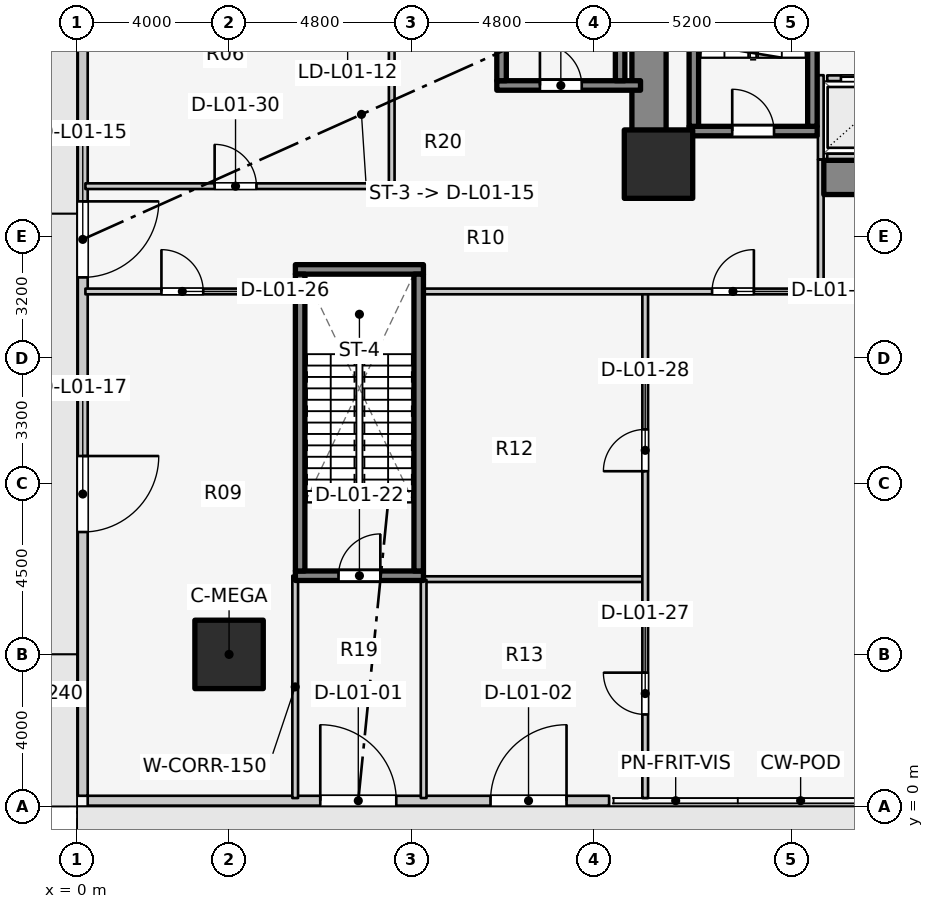
"""IFC4 building model, lengths in metres.
Left out: names, types, materials, properties, quantities, classifications, styles, units other than length and angle.
Written with IfcOpenShell. Run it as: python <this file> out.ifc"""

import sys

from ifc_helpers import new_model, si_unit, direction, frame, frame_2d, origin, origin_2d, place, context, subcontext, project, spatial, rectangle, extrude, element, fill, save


model = new_model("IFC4")
c1 = context("Model", 3, precision=1e-05, world=origin(), true_north=direction((0.0, 1.0)))
c2 = subcontext(c1, "Body", "Model", "MODEL_VIEW")
j1 = project(units=[si_unit("LENGTHUNIT", "METRE"), si_unit("PLANEANGLEUNIT", "RADIAN")], contexts=[c1])
p1 = place(None, origin())
s1 = spatial("IfcSite", under=j1, at=p1, CompositionType="ELEMENT")
p2 = place(p1, origin())
s2 = spatial("IfcBuilding", under=s1, at=p2, CompositionType="ELEMENT")
p3 = place(p2, origin())
s3 = spatial("IfcBuildingStorey", under=s2, at=p3, CompositionType="ELEMENT", Elevation=0.0)
p4 = place(p3, frame((15.05, 17.05, 0.0), z_axis=(0.0, 0.0, 1.0), x_axis=(0.0, 1.0, 0.0)))
e1 = element("IfcWall", 1, at=p4, inside=s3, PredefinedType="SHEAR", context=c2, shape_type="SweptSolid", body=[
    extrude(rectangle(XDim=12.8, YDim=0.9, at=frame_2d((6.4, 0.0))), origin(), (0.0, 0.0, 1.0), 4.6),
])
p5 = place(p3, frame((19.65, 16.55, 0.0), z_axis=(0.0, 0.0, 1.0), x_axis=(1.0, 0.0, 0.0)))
e2 = element("IfcWall", 2, at=p5, inside=s3, PredefinedType="SHEAR", context=c2, shape_type="SweptSolid", body=[
    extrude(rectangle(XDim=4.5, YDim=0.9, at=frame_2d((2.25, 0.0))), origin(), (0.0, 0.0, 1.0), 4.6),
])
p6 = place(p3, frame((16.105, 17.77, 0.0), z_axis=(0.0, 0.0, 1.0), x_axis=(1.0, 0.0, 0.0)))
e3 = element("IfcWall", 3, at=p6, inside=s3, PredefinedType="SOLIDWALL", context=c2, shape_type="SweptSolid", body=[
    extrude(rectangle(XDim=3.37, YDim=0.25, at=frame_2d((1.685, 0.0))), origin(), (0.0, 0.0, 1.0), 4.6),
])
p7 = place(p6, frame((1.135, 0.0, 0.0)))
e4 = element("IfcOpeningElement", 4, at=p7, cuts=e3, PredefinedType="OPENING", context=c2, shape_type="SweptSolid", body=[
    extrude(rectangle(XDim=1.1, YDim=2.1, at=frame_2d((0.55, 1.05))), frame((0.0, 0.135, 0.0), z_axis=(0.0, -1.0, 0.0), x_axis=(1.0, 0.0, 0.0)), (0.0, 0.0, 1.0), 0.27),
])
for number, where, z_axis, x_axis in (
    (5, (16.23, 17.895, 0.0), (0.0, 0.0, 1.0), (0.0, 1.0, 0.0)),
    (6, (19.35, 17.895, 0.0), (0.0, 0.0, 1.0), (0.0, 1.0, 0.0)),
):
    element("IfcWall", number, at=place(p3, frame(where, z_axis=z_axis, x_axis=x_axis)), inside=s3, PredefinedType="SOLIDWALL", context=c2, shape_type="SweptSolid", body=[
        extrude(rectangle(XDim=7.81, YDim=0.25, at=frame_2d((3.905, 0.0))), origin(), (0.0, 0.0, 1.0), 4.6),
    ])
p8 = place(p3, frame((11.045, 18.97, 0.0), z_axis=(0.0, 0.0, 1.0), x_axis=(1.0, 0.0, 0.0)))
e7 = element("IfcWall", 7, at=p8, inside=s3, PredefinedType="SOLIDWALL", context=c2, shape_type="SweptSolid", body=[
    extrude(rectangle(XDim=3.782, YDim=0.25, at=frame_2d((1.891, 0.0))), origin(), (0.0, 0.0, 1.0), 4.6),
])
p9 = place(p8, frame((1.135, 0.0, 0.0)))
e8 = element("IfcOpeningElement", 8, at=p9, cuts=e7, PredefinedType="OPENING", context=c2, shape_type="SweptSolid", body=[
    extrude(rectangle(XDim=1.1, YDim=2.1, at=frame_2d((0.55, 1.05))), frame((0.0, 0.135, 0.0), z_axis=(0.0, -1.0, 0.0), x_axis=(1.0, 0.0, 0.0)), (0.0, 0.0, 1.0), 0.27),
])
for number, where, z_axis, x_axis in (
    (9, (11.17, 19.095, 0.0), (0.0, 0.0, 1.0), (0.0, 1.0, 0.0)),
    (10, (14.29, 19.095, 0.0), (0.0, 0.0, 1.0), (0.0, 1.0, 0.0)),
):
    element("IfcWall", number, at=place(p3, frame(where, z_axis=z_axis, x_axis=x_axis)), inside=s3, PredefinedType="SOLIDWALL", context=c2, shape_type="SweptSolid", body=[
        extrude(rectangle(XDim=7.81, YDim=0.25, at=frame_2d((3.905, 0.0))), origin(), (0.0, 0.0, 1.0), 4.6),
    ])
p10 = place(p3, frame((5.745, 6.07, 0.0), z_axis=(0.0, 0.0, 1.0), x_axis=(1.0, 0.0, 0.0)))
e11 = element("IfcWall", 11, at=p10, inside=s3, PredefinedType="SOLIDWALL", context=c2, shape_type="SweptSolid", body=[
    extrude(rectangle(XDim=3.37, YDim=0.25, at=frame_2d((1.685, 0.0))), origin(), (0.0, 0.0, 1.0), 4.6),
])
p11 = place(p10, frame((1.135, 0.0, 0.0)))
e12 = element("IfcOpeningElement", 12, at=p11, cuts=e11, PredefinedType="OPENING", context=c2, shape_type="SweptSolid", body=[
    extrude(rectangle(XDim=1.1, YDim=2.1, at=frame_2d((0.55, 1.05))), frame((0.0, 0.135, 0.0), z_axis=(0.0, -1.0, 0.0), x_axis=(1.0, 0.0, 0.0)), (0.0, 0.0, 1.0), 0.27),
])
p12 = place(p3, frame((5.745, 14.13, 0.0), z_axis=(0.0, 0.0, 1.0), x_axis=(1.0, 0.0, 0.0)))
e13 = element("IfcWall", 13, at=p12, inside=s3, PredefinedType="SOLIDWALL", context=c2, shape_type="SweptSolid", body=[
    extrude(rectangle(XDim=3.37, YDim=0.25, at=frame_2d((1.685, 0.0))), origin(), (0.0, 0.0, 1.0), 4.6),
])
for number, where, z_axis, x_axis in (
    (14, (5.87, 6.195, 0.0), (0.0, 0.0, 1.0), (0.0, 1.0, 0.0)),
    (15, (8.99, 6.195, 0.0), (0.0, 0.0, 1.0), (0.0, 1.0, 0.0)),
):
    element("IfcWall", number, at=place(p3, frame(where, z_axis=z_axis, x_axis=x_axis)), inside=s3, PredefinedType="SOLIDWALL", context=c2, shape_type="SweptSolid", body=[
        extrude(rectangle(XDim=7.81, YDim=0.25, at=frame_2d((3.905, 0.0))), origin(), (0.0, 0.0, 1.0), 4.6),
    ])
for number, where, z_axis, x_axis in (
    (16, (15.3, 16.9, 0.0), (0.0, 0.0, 1.0), (1.0, 0.0, 0.0)),
    (17, (4.0, 4.0, 0.0), (0.0, 0.0, 1.0), (1.0, 0.0, 0.0)),
):
    element("IfcColumn", number, at=place(p3, frame(where, z_axis=z_axis, x_axis=x_axis)), inside=s3, PredefinedType="COLUMN", context=c2, shape_type="SweptSolid", body=[
        extrude(rectangle(XDim=1.8, YDim=1.8, at=origin_2d()), origin(), (0.0, 0.0, 1.0), 4.6),
    ])
p13 = place(p3, frame((0.28, 0.15, 0.0), z_axis=(0.0, 0.0, 1.0), x_axis=(1.0, 0.0, 0.0)))
e18 = element("IfcWall", 18, at=p13, inside=s3, PredefinedType="STANDARD", context=c2, shape_type="SweptSolid", body=[
    extrude(rectangle(XDim=13.72, YDim=0.26, at=frame_2d((6.86, 0.0))), origin(), (0.0, 0.0, 1.0), 4.28),
])
p14 = place(p13, frame((6.12, 0.0, 0.0)))
e19 = element("IfcOpeningElement", 19, at=p14, cuts=e18, PredefinedType="OPENING", context=c2, shape_type="SweptSolid", body=[
    extrude(rectangle(XDim=2.0, YDim=2.4, at=frame_2d((1.0, 1.2))), frame((0.0, 0.14, 0.0), z_axis=(0.0, -1.0, 0.0), x_axis=(1.0, 0.0, 0.0)), (0.0, 0.0, 1.0), 0.28),
])
p15 = place(p13, frame((10.6, 0.0, 0.0)))
e20 = element("IfcOpeningElement", 20, at=p15, cuts=e18, PredefinedType="OPENING", context=c2, shape_type="SweptSolid", body=[
    extrude(rectangle(XDim=2.0, YDim=2.4, at=frame_2d((1.0, 1.2))), frame((0.0, 0.14, 0.0), z_axis=(0.0, -1.0, 0.0), x_axis=(1.0, 0.0, 0.0)), (0.0, 0.0, 1.0), 0.28),
])
p16 = place(p3, frame((0.15, 45.72, 0.0), z_axis=(0.0, 0.0, 1.0), x_axis=(0.0, -1.0, 0.0)))
e21 = element("IfcWall", 21, at=p16, inside=s3, PredefinedType="STANDARD", context=c2, shape_type="SweptSolid", body=[
    extrude(rectangle(XDim=45.44, YDim=0.26, at=frame_2d((22.72, 0.0))), origin(), (0.0, 0.0, 1.0), 4.28),
])
p17 = place(p16, frame((29.8, 0.0, 0.0)))
e22 = element("IfcOpeningElement", 22, at=p17, cuts=e21, PredefinedType="OPENING", context=c2, shape_type="SweptSolid", body=[
    extrude(rectangle(XDim=2.0, YDim=2.4, at=frame_2d((1.0, 1.2))), frame((0.0, 0.14, 0.0), z_axis=(0.0, -1.0, 0.0), x_axis=(1.0, 0.0, 0.0)), (0.0, 0.0, 1.0), 0.28),
])
p18 = place(p16, frame((22.0, 0.0, 0.0)))
e23 = element("IfcOpeningElement", 23, at=p18, cuts=e21, PredefinedType="OPENING", context=c2, shape_type="SweptSolid", body=[
    extrude(rectangle(XDim=2.0, YDim=2.4, at=frame_2d((1.0, 1.2))), frame((0.0, 0.14, 0.0), z_axis=(0.0, -1.0, 0.0), x_axis=(1.0, 0.0, 0.0)), (0.0, 0.0, 1.0), 0.28),
])
p19 = place(p16, frame((36.5, 0.0, 0.0)))
e24 = element("IfcOpeningElement", 24, at=p19, cuts=e21, PredefinedType="OPENING", context=c2, shape_type="SweptSolid", body=[
    extrude(rectangle(XDim=2.0, YDim=2.4, at=frame_2d((1.0, 1.2))), frame((0.0, 0.14, 0.0), z_axis=(0.0, -1.0, 0.0), x_axis=(1.0, 0.0, 0.0)), (0.0, 0.0, 1.0), 0.28),
])
p20 = place(p16, frame((12.1, 0.0, 0.0)))
e25 = element("IfcOpeningElement", 25, at=p20, cuts=e21, PredefinedType="OPENING", context=c2, shape_type="SweptSolid", body=[
    extrude(rectangle(XDim=4.2, YDim=3.0, at=frame_2d((2.1, 1.5))), frame((0.0, 0.14, 0.0), z_axis=(0.0, -1.0, 0.0), x_axis=(1.0, 0.0, 0.0)), (0.0, 0.0, 1.0), 0.28),
])
p21 = place(p3, frame((19.74, 19.16, 0.0), z_axis=(0.0, 0.0, 1.0), x_axis=(1.0, 0.0, 0.0)))
e26 = element("IfcWall", 26, at=p21, inside=s3, PredefinedType="SOLIDWALL", context=c2, shape_type="SweptSolid", body=[
    extrude(rectangle(XDim=1.82, YDim=0.15, at=frame_2d((0.91, 0.0))), origin(), (0.0, 0.0, 1.0), 4.255),
])
p22 = place(p21, frame((0.36, 0.0, 0.0)))
e27 = element("IfcOpeningElement", 27, at=p22, cuts=e26, PredefinedType="OPENING", context=c2, shape_type="SweptSolid", body=[
    extrude(rectangle(XDim=1.1, YDim=2.1, at=frame_2d((0.55, 1.05))), frame((0.0, 0.085, 0.0), z_axis=(0.0, -1.0, 0.0), x_axis=(1.0, 0.0, 0.0)), (0.0, 0.0, 1.0), 0.17),
])
p23 = place(p3, frame((19.74, 17.1, 0.0), z_axis=(0.0, 0.0, 1.0), x_axis=(1.0, 0.0, 0.0)))
e28 = element("IfcWall", 28, at=p23, inside=s3, PredefinedType="SOLIDWALL", context=c2, shape_type="SweptSolid", body=[
    extrude(rectangle(XDim=1.82, YDim=0.15, at=frame_2d((0.91, 0.0))), origin(), (0.0, 0.0, 1.0), 4.255),
])
p24 = place(p3, frame((19.57, 17.02, 0.0), z_axis=(0.0, 0.0, 1.0), x_axis=(0.0, 1.0, 0.0)))
e29 = element("IfcWall", 29, at=p24, inside=s3, PredefinedType="SOLIDWALL", context=c2, shape_type="SweptSolid", body=[
    extrude(rectangle(XDim=2.22, YDim=0.15, at=frame_2d((1.11, 0.0))), origin(), (0.0, 0.0, 1.0), 3.62),
])
p25 = place(p3, frame((5.74, 0.22, 0.0), z_axis=(0.0, 0.0, 1.0), x_axis=(0.0, 1.0, 0.0)))
e30 = element("IfcWall", 30, at=p25, inside=s3, PredefinedType="PARTITIONING", context=c2, shape_type="SweptSolid", body=[
    extrude(rectangle(XDim=5.85, YDim=0.15, at=frame_2d((2.925, 0.0))), origin(), (0.0, 0.0, 1.0), 3.3),
])
p26 = place(p3, frame((0.22, 13.55, 0.0), z_axis=(0.0, 0.0, 1.0), x_axis=(1.0, 0.0, 0.0)))
e31 = element("IfcWall", 31, at=p26, inside=s3, PredefinedType="PARTITIONING", context=c2, shape_type="SweptSolid", body=[
    extrude(rectangle(XDim=5.58, YDim=0.15, at=frame_2d((2.79, 0.0))), origin(), (0.0, 0.0, 1.0), 3.3),
])
p27 = place(p26, frame((2.0, 0.0, 0.0)))
e32 = element("IfcOpeningElement", 32, at=p27, cuts=e31, PredefinedType="OPENING", context=c2, shape_type="SweptSolid", body=[
    extrude(rectangle(XDim=1.1, YDim=2.1, at=frame_2d((0.55, 1.05))), frame((0.0, 0.085, 0.0), z_axis=(0.0, -1.0, 0.0), x_axis=(1.0, 0.0, 0.0)), (0.0, 0.0, 1.0), 0.17),
])
p28 = place(p3, frame((9.12, 5.98, 0.0), z_axis=(0.0, 0.0, 1.0), x_axis=(1.0, 0.0, 0.0)))
e33 = element("IfcWall", 33, at=p28, inside=s3, PredefinedType="PARTITIONING", context=c2, shape_type="SweptSolid", body=[
    extrude(rectangle(XDim=5.86, YDim=0.15, at=frame_2d((2.93, 0.0))), origin(), (0.0, 0.0, 1.0), 4.255),
])
p29 = place(p3, frame((9.12, 0.22, 0.0), z_axis=(0.0, 0.0, 1.0), x_axis=(0.0, 1.0, 0.0)))
e34 = element("IfcWall", 34, at=p29, inside=s3, PredefinedType="PARTITIONING", context=c2, shape_type="SweptSolid", body=[
    extrude(rectangle(XDim=5.74, YDim=0.15, at=frame_2d((2.87, 0.0))), origin(), (0.0, 0.0, 1.0), 3.3),
])
p30 = place(p3, frame((14.95, 0.22, 0.0), z_axis=(0.0, 0.0, 1.0), x_axis=(0.0, 1.0, 0.0)))
e35 = element("IfcWall", 35, at=p30, inside=s3, PredefinedType="PARTITIONING", context=c2, shape_type="SweptSolid", body=[
    extrude(rectangle(XDim=13.36, YDim=0.15, at=frame_2d((6.68, 0.0))), origin(), (0.0, 0.0, 1.0), 3.3),
])
p31 = place(p30, frame((2.2, 0.0, 0.0)))
e36 = element("IfcOpeningElement", 36, at=p31, cuts=e35, PredefinedType="OPENING", context=c2, shape_type="SweptSolid", body=[
    extrude(rectangle(XDim=1.1, YDim=2.1, at=frame_2d((0.55, 1.05))), frame((0.0, 0.085, 0.0), z_axis=(0.0, -1.0, 0.0), x_axis=(1.0, 0.0, 0.0)), (0.0, 0.0, 1.0), 0.17),
])
p32 = place(p30, frame((8.6, 0.0, 0.0)))
e37 = element("IfcOpeningElement", 37, at=p32, cuts=e35, PredefinedType="OPENING", context=c2, shape_type="SweptSolid", body=[
    extrude(rectangle(XDim=1.1, YDim=2.1, at=frame_2d((0.55, 1.05))), frame((0.0, 0.085, 0.0), z_axis=(0.0, -1.0, 0.0), x_axis=(1.0, 0.0, 0.0)), (0.0, 0.0, 1.0), 0.17),
])
p33 = place(p3, frame((9.11, 13.55, 0.0), z_axis=(0.0, 0.0, 1.0), x_axis=(1.0, 0.0, 0.0)))
e38 = element("IfcWall", 38, at=p33, inside=s3, PredefinedType="PARTITIONING", context=c2, shape_type="SweptSolid", body=[
    extrude(rectangle(XDim=10.46, YDim=0.15, at=frame_2d((5.23, 0.0))), origin(), (0.0, 0.0, 1.0), 4.255),
])
p34 = place(p33, frame((7.6, 0.0, 0.0)))
e39 = element("IfcOpeningElement", 39, at=p34, cuts=e38, PredefinedType="OPENING", context=c2, shape_type="SweptSolid", body=[
    extrude(rectangle(XDim=1.1, YDim=2.1, at=frame_2d((0.55, 1.05))), frame((0.0, 0.085, 0.0), z_axis=(0.0, -1.0, 0.0), x_axis=(1.0, 0.0, 0.0)), (0.0, 0.0, 1.0), 0.17),
])
p35 = place(p3, frame((19.57, 13.55, 0.0), z_axis=(0.0, 0.0, 1.0), x_axis=(0.0, 1.0, 0.0)))
e40 = element("IfcWall", 40, at=p35, inside=s3, PredefinedType="PARTITIONING", context=c2, shape_type="SweptSolid", body=[
    extrude(rectangle(XDim=3.47, YDim=0.15, at=frame_2d((1.735, 0.0))), origin(), (0.0, 0.0, 1.0), 4.255),
])
p36 = place(p3, frame((0.22, 16.32, 0.0), z_axis=(0.0, 0.0, 1.0), x_axis=(1.0, 0.0, 0.0)))
e41 = element("IfcWall", 41, at=p36, inside=s3, PredefinedType="PARTITIONING", context=c2, shape_type="SweptSolid", body=[
    extrude(rectangle(XDim=8.1, YDim=0.15, at=frame_2d((4.05, 0.0))), origin(), (0.0, 0.0, 1.0), 3.3),
])
p37 = place(p36, frame((3.4, 0.0, 0.0)))
e42 = element("IfcOpeningElement", 42, at=p37, cuts=e41, PredefinedType="OPENING", context=c2, shape_type="SweptSolid", body=[
    extrude(rectangle(XDim=1.1, YDim=2.1, at=frame_2d((0.55, 1.05))), frame((0.0, 0.085, 0.0), z_axis=(0.0, -1.0, 0.0), x_axis=(1.0, 0.0, 0.0)), (0.0, 0.0, 1.0), 0.17),
])
p38 = place(p3, frame((8.28, 16.3, 0.0), z_axis=(0.0, 0.0, 1.0), x_axis=(0.0, 1.0, 0.0)))
e43 = element("IfcWall", 43, at=p38, inside=s3, PredefinedType="PARTITIONING", context=c2, shape_type="SweptSolid", body=[
    extrude(rectangle(XDim=12.2, YDim=0.15, at=frame_2d((6.1, 0.0))), origin(), (0.0, 0.0, 1.0), 4.255),
])
p39 = place(p14, frame((2.0, 0.0, 0.0), z_axis=(0.0, 0.0, 1.0), x_axis=(-1.0, 0.0, 0.0)))
e44 = element("IfcDoor", 44, at=p39, inside=s3, OperationType="SINGLE_SWING_LEFT", PredefinedType="DOOR", context=c2, shape_type="SweptSolid", body=[
    extrude(rectangle(XDim=2.0, YDim=2.4, at=frame_2d((1.0, 1.2))), frame((0.0, 0.025, 0.0), z_axis=(0.0, -1.0, 0.0), x_axis=(1.0, 0.0, 0.0)), (0.0, 0.0, 1.0), 0.05),
])
fill(e19, e44)
p40 = place(p15, frame((2.0, 0.0, 0.0), z_axis=(0.0, 0.0, 1.0), x_axis=(-1.0, 0.0, 0.0)))
e45 = element("IfcDoor", 45, at=p40, inside=s3, OperationType="SINGLE_SWING_RIGHT", PredefinedType="DOOR", context=c2, shape_type="SweptSolid", body=[
    extrude(rectangle(XDim=2.0, YDim=2.4, at=frame_2d((1.0, 1.2))), frame((0.0, 0.025, 0.0), z_axis=(0.0, -1.0, 0.0), x_axis=(1.0, 0.0, 0.0)), (0.0, 0.0, 1.0), 0.05),
])
fill(e20, e45)
p41 = place(p17, frame((2.0, 0.0, 0.0), z_axis=(0.0, 0.0, 1.0), x_axis=(-1.0, 0.0, 0.0)))
e46 = element("IfcDoor", 46, at=p41, inside=s3, OperationType="SINGLE_SWING_LEFT", PredefinedType="DOOR", context=c2, shape_type="SweptSolid", body=[
    extrude(rectangle(XDim=2.0, YDim=2.4, at=frame_2d((1.0, 1.2))), frame((0.0, 0.025, 0.0), z_axis=(0.0, -1.0, 0.0), x_axis=(1.0, 0.0, 0.0)), (0.0, 0.0, 1.0), 0.05),
])
fill(e22, e46)
p42 = place(p19, frame((2.0, 0.0, 0.0), z_axis=(0.0, 0.0, 1.0), x_axis=(-1.0, 0.0, 0.0)))
e47 = element("IfcDoor", 47, at=p42, inside=s3, OperationType="SINGLE_SWING_LEFT", PredefinedType="DOOR", context=c2, shape_type="SweptSolid", body=[
    extrude(rectangle(XDim=2.0, YDim=2.4, at=frame_2d((1.0, 1.2))), frame((0.0, 0.025, 0.0), z_axis=(0.0, -1.0, 0.0), x_axis=(1.0, 0.0, 0.0)), (0.0, 0.0, 1.0), 0.05),
])
fill(e24, e47)
p43 = place(p7, origin())
e48 = element("IfcDoor", 48, at=p43, inside=s3, OperationType="SINGLE_SWING_LEFT", PredefinedType="DOOR", context=c2, shape_type="SweptSolid", body=[
    extrude(rectangle(XDim=1.1, YDim=2.1, at=frame_2d((0.55, 1.05))), frame((0.0, 0.025, 0.0), z_axis=(0.0, -1.0, 0.0), x_axis=(1.0, 0.0, 0.0)), (0.0, 0.0, 1.0), 0.05),
])
fill(e4, e48)
p44 = place(p9, origin())
e49 = element("IfcDoor", 49, at=p44, inside=s3, OperationType="SINGLE_SWING_LEFT", PredefinedType="DOOR", context=c2, shape_type="SweptSolid", body=[
    extrude(rectangle(XDim=1.1, YDim=2.1, at=frame_2d((0.55, 1.05))), frame((0.0, 0.025, 0.0), z_axis=(0.0, -1.0, 0.0), x_axis=(1.0, 0.0, 0.0)), (0.0, 0.0, 1.0), 0.05),
])
fill(e8, e49)
p45 = place(p11, origin())
e50 = element("IfcDoor", 50, at=p45, inside=s3, OperationType="SINGLE_SWING_RIGHT", PredefinedType="DOOR", context=c2, shape_type="SweptSolid", body=[
    extrude(rectangle(XDim=1.1, YDim=2.1, at=frame_2d((0.55, 1.05))), frame((0.0, 0.025, 0.0), z_axis=(0.0, -1.0, 0.0), x_axis=(1.0, 0.0, 0.0)), (0.0, 0.0, 1.0), 0.05),
])
fill(e12, e50)
p46 = place(p22, origin())
e51 = element("IfcDoor", 51, at=p46, inside=s3, OperationType="DOUBLE_DOOR_SLIDING", PredefinedType="DOOR", context=c2, shape_type="SweptSolid", body=[
    extrude(rectangle(XDim=1.1, YDim=2.1, at=frame_2d((0.55, 1.05))), frame((0.0, 0.025, 0.0), z_axis=(0.0, -1.0, 0.0), x_axis=(1.0, 0.0, 0.0)), (0.0, 0.0, 1.0), 0.05),
])
fill(e27, e51)
p47 = place(p27, origin())
e52 = element("IfcDoor", 52, at=p47, inside=s3, OperationType="SINGLE_SWING_LEFT", PredefinedType="DOOR", context=c2, shape_type="SweptSolid", body=[
    extrude(rectangle(XDim=1.1, YDim=2.1, at=frame_2d((0.55, 1.05))), frame((0.0, 0.025, 0.0), z_axis=(0.0, -1.0, 0.0), x_axis=(1.0, 0.0, 0.0)), (0.0, 0.0, 1.0), 0.05),
])
fill(e32, e52)
p48 = place(p31, origin())
e53 = element("IfcDoor", 53, at=p48, inside=s3, OperationType="SINGLE_SWING_RIGHT", PredefinedType="DOOR", context=c2, shape_type="SweptSolid", body=[
    extrude(rectangle(XDim=1.1, YDim=2.1, at=frame_2d((0.55, 1.05))), frame((0.0, 0.025, 0.0), z_axis=(0.0, -1.0, 0.0), x_axis=(1.0, 0.0, 0.0)), (0.0, 0.0, 1.0), 0.05),
])
fill(e36, e53)
p49 = place(p32, origin())
e54 = element("IfcDoor", 54, at=p49, inside=s3, OperationType="SINGLE_SWING_LEFT", PredefinedType="DOOR", context=c2, shape_type="SweptSolid", body=[
    extrude(rectangle(XDim=1.1, YDim=2.1, at=frame_2d((0.55, 1.05))), frame((0.0, 0.025, 0.0), z_axis=(0.0, -1.0, 0.0), x_axis=(1.0, 0.0, 0.0)), (0.0, 0.0, 1.0), 0.05),
])
fill(e37, e54)
p50 = place(p34, origin())
e55 = element("IfcDoor", 55, at=p50, inside=s3, OperationType="SINGLE_SWING_RIGHT", PredefinedType="DOOR", context=c2, shape_type="SweptSolid", body=[
    extrude(rectangle(XDim=1.1, YDim=2.1, at=frame_2d((0.55, 1.05))), frame((0.0, 0.025, 0.0), z_axis=(0.0, -1.0, 0.0), x_axis=(1.0, 0.0, 0.0)), (0.0, 0.0, 1.0), 0.05),
])
fill(e39, e55)
p51 = place(p37, origin())
e56 = element("IfcDoor", 56, at=p51, inside=s3, OperationType="SINGLE_SWING_LEFT", PredefinedType="DOOR", context=c2, shape_type="SweptSolid", body=[
    extrude(rectangle(XDim=1.1, YDim=2.1, at=frame_2d((0.55, 1.05))), frame((0.0, 0.025, 0.0), z_axis=(0.0, -1.0, 0.0), x_axis=(1.0, 0.0, 0.0)), (0.0, 0.0, 1.0), 0.05),
])
fill(e42, e56)
save(model, sys.argv[1])
